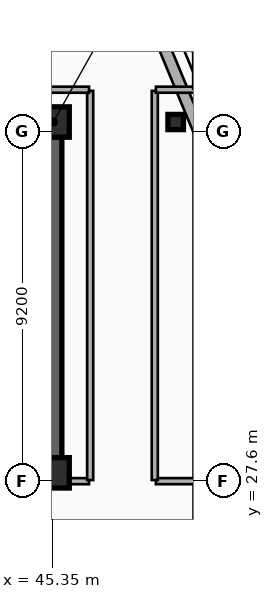
"""IFC4 building model, lengths in metres.
Left out: names, types, materials, properties, quantities, classifications, styles, units other than length and angle.
Written with IfcOpenShell. Run it as: python <this file> out.ifc"""

import sys

from ifc_helpers import new_model, si_unit, direction, frame, frame_2d, origin, origin_2d, place, context, subcontext, project, spatial, rectangle, i_section, extrude, element, save


model = new_model("IFC4")
c1 = context("Model", 3, precision=1e-05, world=origin(), true_north=direction((0.0, 1.0)))
c2 = subcontext(c1, "Body", "Model", "MODEL_VIEW")
j1 = project(units=[si_unit("LENGTHUNIT", "METRE"), si_unit("PLANEANGLEUNIT", "RADIAN")], contexts=[c1])
p1 = place(None, origin())
s1 = spatial("IfcSite", under=j1, at=p1, CompositionType="ELEMENT")
p2 = place(p1, origin())
s2 = spatial("IfcBuilding", under=s1, at=p2, CompositionType="ELEMENT")
p3 = place(p2, frame((0.0, 0.0, 247.3)))
s3 = spatial("IfcBuildingStorey", under=s2, at=p3, CompositionType="ELEMENT", Elevation=247.3)
p4 = place(p3, frame((12.15, 37.05, 0.0), z_axis=(0.0, 0.0, 1.0), x_axis=(1.0, 0.0, 0.0)))
e1 = element("IfcWall", 1, at=p4, inside=s3, PredefinedType="SHEAR", context=c2, shape_type="SweptSolid", body=[
    extrude(rectangle(XDim=33.23, YDim=0.45, at=frame_2d((16.615, 0.0))), origin(), (0.0, 0.0, 1.0), 3.7),
])
p5 = place(p3, frame((45.38, 27.82, 0.0), z_axis=(0.0, 0.0, 1.0), x_axis=(-1.0, 0.0, 0.0)))
e2 = element("IfcWall", 2, at=p5, inside=s3, PredefinedType="SHEAR", context=c2, shape_type="SweptSolid", body=[
    extrude(rectangle(XDim=12.23, YDim=0.45, at=frame_2d((6.115, 0.0))), origin(), (0.0, 0.0, 1.0), 3.7),
])
p6 = place(p5, frame((9.93, 0.0, 0.0)))
e3 = element("IfcOpeningElement", 3, at=p6, cuts=e2, PredefinedType="OPENING", context=c2, shape_type="SweptSolid", body=[
    extrude(rectangle(XDim=1.1, YDim=2.15, at=frame_2d((0.55, 1.075))), frame((0.0, 0.235, 0.0), z_axis=(0.0, -1.0, 0.0), x_axis=(1.0, 0.0, 0.0)), (0.0, 0.0, 1.0), 0.47),
])
p7 = place(p5, frame((6.23, 0.0, 0.0)))
e4 = element("IfcOpeningElement", 4, at=p7, cuts=e2, PredefinedType="OPENING", context=c2, shape_type="SweptSolid", body=[
    extrude(rectangle(XDim=1.1, YDim=2.15, at=frame_2d((0.55, 1.075))), frame((0.0, 0.235, 0.0), z_axis=(0.0, -1.0, 0.0), x_axis=(1.0, 0.0, 0.0)), (0.0, 0.0, 1.0), 0.47),
])
p8 = place(p3, frame((45.38, 28.045, 0.0), z_axis=(0.0, 0.0, 1.0), x_axis=(0.0, 1.0, 0.0)))
e5 = element("IfcWall", 5, at=p8, inside=s3, PredefinedType="SHEAR", context=c2, shape_type="SweptSolid", body=[
    extrude(rectangle(XDim=8.78, YDim=0.45, at=frame_2d((4.39, 0.0))), origin(), (0.0, 0.0, 1.0), 3.7),
])
for number, where, z_axis, x_axis in (
    (6, (45.4, 27.82, 0.0), (0.0, 0.0, 1.0), (1.0, 0.0, 0.0)),
    (7, (45.4, 37.05, 0.0), (0.0, 0.0, 1.0), (1.0, 0.0, 0.0)),
):
    element("IfcColumn", number, at=place(p3, frame(where, z_axis=z_axis, x_axis=x_axis)), inside=s3, PredefinedType="COLUMN", context=c2, shape_type="SweptSolid", body=[
        extrude(rectangle(XDim=0.8, YDim=0.8, at=origin_2d()), origin(), (0.0, 0.0, 1.0), 3.7),
    ])
p9 = place(p3, frame((48.6, 37.05, 0.0), z_axis=(0.0, 0.0, 1.0), x_axis=(1.0, 0.0, 0.0)))
e8 = element("IfcColumn", 8, at=p9, inside=s3, PredefinedType="COLUMN", context=c2, shape_type="SweptSolid", body=[
    extrude(i_section(OverallWidth=0.408, OverallDepth=0.4, WebThickness=0.025, FlangeThickness=0.039, FilletRadius=0.015, at=origin_2d()), origin(), (0.0, 0.0, 1.0), 3.7),
])
p10 = place(p3, frame((48.042, 39.643, 0.0), z_axis=(0.0, 0.0, 1.0), x_axis=(0.382704529509, -0.923870793506, 0.0)))
e9 = element("IfcWall", 9, at=p10, inside=s3, PredefinedType="SOLIDWALL", context=c2, shape_type="SweptSolid", body=[
    extrude(rectangle(XDim=3.077, YDim=0.3, at=frame_2d((1.538, 0.0))), origin(), (0.0, 0.0, 1.0), 3.42),
])
p11 = place(p3, frame((45.41, 27.6, 0.0), z_axis=(0.0, 0.0, 1.0), x_axis=(1.0, 0.0, 0.0)))
e10 = element("IfcWall", 10, at=p11, inside=s3, PredefinedType="PARTITIONING", context=c2, shape_type="SweptSolid", body=[
    extrude(rectangle(XDim=0.91, YDim=0.16, at=frame_2d((0.455, 0.0))), origin(), (0.0, 0.0, 1.0), 2.49),
])
p12 = place(p3, frame((48.08, 27.6, 0.0), z_axis=(0.0, 0.0, 1.0), x_axis=(1.0, 0.0, 0.0)))
e11 = element("IfcWall", 11, at=p12, inside=s3, PredefinedType="PARTITIONING", context=c2, shape_type="SweptSolid", body=[
    extrude(rectangle(XDim=1.03, YDim=0.16, at=frame_2d((0.515, 0.0))), origin(), (0.0, 0.0, 1.0), 3.42),
])
for number, where, z_axis, x_axis in (
    (12, (46.35, 27.63, 0.0), (0.0, 0.0, 1.0), (0.0, 1.0, 0.0)),
    (13, (48.05, 27.63, 0.0), (0.0, 0.0, 1.0), (0.0, 1.0, 0.0)),
):
    element("IfcWall", number, at=place(p3, frame(where, z_axis=z_axis, x_axis=x_axis)), inside=s3, PredefinedType="PARTITIONING", context=c2, shape_type="SweptSolid", body=[
        extrude(rectangle(XDim=10.24, YDim=0.16, at=frame_2d((5.12, 0.0))), origin(), (0.0, 0.0, 1.0), 2.9),
    ])
p13 = place(p3, frame((11.28, 37.9, 0.0), z_axis=(0.0, 0.0, 1.0), x_axis=(1.0, 0.0, 0.0)))
e14 = element("IfcWall", 14, at=p13, inside=s3, PredefinedType="PARTITIONING", context=c2, shape_type="SweptSolid", body=[
    extrude(rectangle(XDim=35.04, YDim=0.16, at=frame_2d((17.52, 0.0))), origin(), (0.0, 0.0, 1.0), 3.42),
])
p14 = place(p3, frame((48.08, 37.9, 0.0), z_axis=(0.0, 0.0, 1.0), x_axis=(1.0, 0.0, 0.0)))
e15 = element("IfcWall", 15, at=p14, inside=s3, PredefinedType="PARTITIONING", context=c2, shape_type="SweptSolid", body=[
    extrude(rectangle(XDim=1.03, YDim=0.16, at=frame_2d((0.515, 0.0))), origin(), (0.0, 0.0, 1.0), 3.42),
])
save(model, sys.argv[1])
